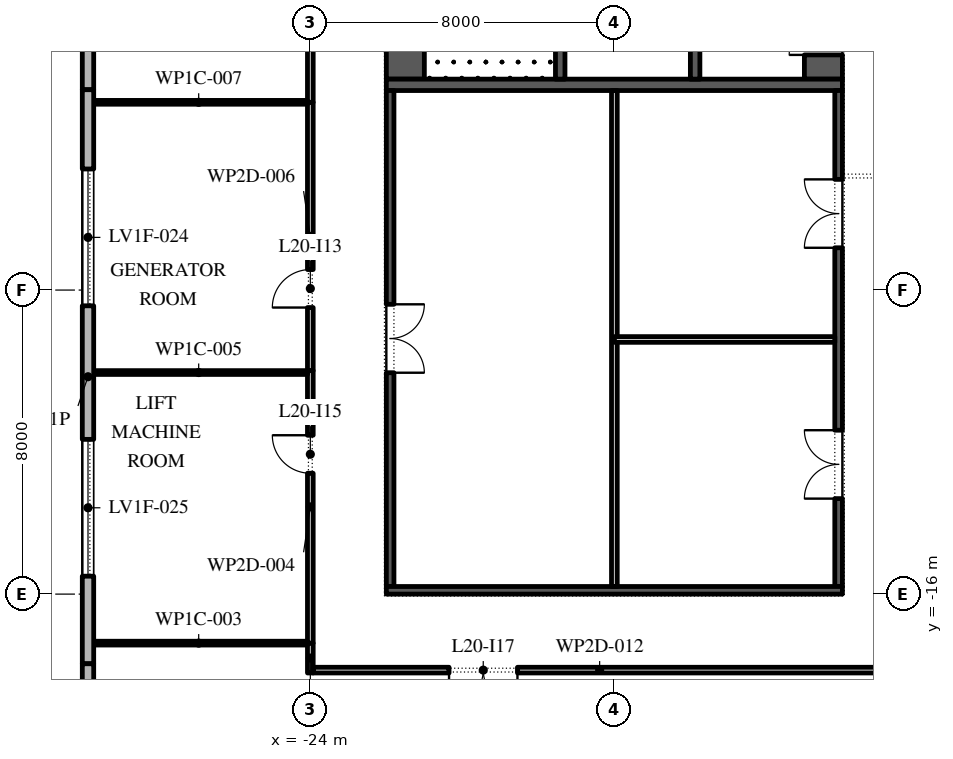
"""IFC4 building model, lengths in metres.
Left out: names, types, materials, properties, quantities, classifications, styles, units other than length and angle.
Written with IfcOpenShell. Run it as: python <this file> out.ifc"""

import sys

from ifc_helpers import new_model, si_unit, direction, frame, frame_2d, origin, place, context, subcontext, project, spatial, rectangle, extrude, element, fill, save


model = new_model("IFC4")
c1 = context("Model", 3, precision=1e-05, world=origin(), true_north=direction((0.0, 1.0)))
c2 = subcontext(c1, "Body", "Model", "MODEL_VIEW")
j1 = project(units=[si_unit("LENGTHUNIT", "METRE"), si_unit("PLANEANGLEUNIT", "RADIAN")], contexts=[c1])
p1 = place(None, origin())
s1 = spatial("IfcSite", under=j1, at=p1, CompositionType="ELEMENT")
p2 = place(p1, origin())
s2 = spatial("IfcBuilding", under=s1, at=p2, CompositionType="ELEMENT")
p3 = place(p2, frame((0.0, 0.0, 94.2)))
s3 = spatial("IfcBuildingStorey", under=s2, at=p3, CompositionType="ELEMENT", Elevation=94.2)
p4 = place(p3, frame((-21.5, -2.45, 0.0), z_axis=(0.0, 0.0, 1.0), x_axis=(0.0, 1.0, 0.0)))
e1 = element("IfcWall", 1, at=p4, inside=s3, PredefinedType="SHEAR", context=c2, shape_type="SweptSolid", body=[
    extrude(rectangle(XDim=27.9, YDim=1.0, at=frame_2d((13.95, 0.0))), origin(), (0.0, 0.0, 1.0), 4.95),
])
p5 = place(p4, frame((5.05, 0.0, 0.0)))
e2 = element("IfcOpeningElement", 2, at=p5, cuts=e1, PredefinedType="OPENING", context=c2, shape_type="SweptSolid", body=[
    extrude(rectangle(XDim=1.2, YDim=2.1, at=frame_2d((0.6, 1.05))), frame((0.0, 0.51, 0.0), z_axis=(0.0, -1.0, 0.0), x_axis=(1.0, 0.0, 0.0)), (0.0, 0.0, 1.0), 1.02),
])
p6 = place(p4, frame((21.65, 0.0, 0.0)))
e3 = element("IfcOpeningElement", 3, at=p6, cuts=e1, PredefinedType="OPENING", context=c2, shape_type="SweptSolid", body=[
    extrude(rectangle(XDim=1.2, YDim=2.1, at=frame_2d((0.6, 1.05))), frame((0.0, 0.51, 0.0), z_axis=(0.0, -1.0, 0.0), x_axis=(1.0, 0.0, 0.0)), (0.0, 0.0, 1.0), 1.02),
])
p7 = place(p3, frame((-10.5, -2.45, 0.0), z_axis=(0.0, 0.0, 1.0), x_axis=(0.0, 1.0, 0.0)))
e4 = element("IfcWall", 4, at=p7, inside=s3, PredefinedType="SHEAR", context=c2, shape_type="SweptSolid", body=[
    extrude(rectangle(XDim=27.9, YDim=1.0, at=frame_2d((13.95, 0.0))), origin(), (0.0, 0.0, 1.0), 4.95),
])
p8 = place(p7, frame((23.65, 0.0, 0.0)))
e5 = element("IfcOpeningElement", 5, at=p8, cuts=e4, PredefinedType="OPENING", context=c2, shape_type="SweptSolid", body=[
    extrude(rectangle(XDim=2.4, YDim=2.1, at=frame_2d((1.2, 1.05))), frame((0.0, 0.51, 0.0), z_axis=(0.0, -1.0, 0.0), x_axis=(1.0, 0.0, 0.0)), (0.0, 0.0, 1.0), 1.02),
])
p9 = place(p7, frame((0.637, 0.0, 0.0)))
e6 = element("IfcOpeningElement", 6, at=p9, cuts=e4, PredefinedType="OPENING", context=c2, shape_type="SweptSolid", body=[
    extrude(rectangle(XDim=1.8, YDim=2.4, at=frame_2d((0.9, 1.2))), frame((0.0, 0.51, 0.0), z_axis=(0.0, -1.0, 0.0), x_axis=(1.0, 0.0, 0.0)), (0.0, 0.0, 1.0), 1.02),
])
p10 = place(p7, frame((3.863, 0.0, 0.0)))
e7 = element("IfcOpeningElement", 7, at=p10, cuts=e4, PredefinedType="OPENING", context=c2, shape_type="SweptSolid", body=[
    extrude(rectangle(XDim=1.8, YDim=2.4, at=frame_2d((0.9, 1.2))), frame((0.0, 0.51, 0.0), z_axis=(0.0, -1.0, 0.0), x_axis=(1.0, 0.0, 0.0)), (0.0, 0.0, 1.0), 1.02),
])
p11 = place(p3, frame((-22.0, -2.6, 0.0), z_axis=(0.0, 0.0, 1.0), x_axis=(1.0, 0.0, 0.0)))
e8 = element("IfcWall", 8, at=p11, inside=s3, PredefinedType="SHEAR", context=c2, shape_type="SweptSolid", body=[
    extrude(rectangle(XDim=12.0, YDim=0.3, at=frame_2d((6.0, 0.0))), origin(), (0.0, 0.0, 1.0), 4.95),
])
p12 = place(p3, frame((-17.425, -2.45, 0.0), z_axis=(0.0, 0.0, 1.0), x_axis=(0.0, 1.0, 0.0)))
e9 = element("IfcWall", 9, at=p12, inside=s3, PredefinedType="SHEAR", context=c2, shape_type="SweptSolid", body=[
    extrude(rectangle(XDim=6.3, YDim=0.25, at=frame_2d((3.15, 0.0))), origin(), (0.0, 0.0, 1.0), 4.95),
])
p13 = place(p12, frame((5.05, 0.0, 0.0)))
e10 = element("IfcOpeningElement", 10, at=p13, cuts=e9, PredefinedType="OPENING", context=c2, shape_type="SweptSolid", body=[
    extrude(rectangle(XDim=1.2, YDim=2.1, at=frame_2d((0.6, 1.05))), frame((0.0, 0.135, 0.0), z_axis=(0.0, -1.0, 0.0), x_axis=(1.0, 0.0, 0.0)), (0.0, 0.0, 1.0), 0.27),
])
p14 = place(p3, frame((-13.875, -2.45, 0.0), z_axis=(0.0, 0.0, 1.0), x_axis=(0.0, 1.0, 0.0)))
e11 = element("IfcWall", 11, at=p14, inside=s3, PredefinedType="SHEAR", context=c2, shape_type="SweptSolid", body=[
    extrude(rectangle(XDim=21.3, YDim=0.25, at=frame_2d((10.65, 0.0))), origin(), (0.0, 0.0, 1.0), 4.95),
])
p15 = place(p14, frame((14.121, 0.0, 0.0)))
e12 = element("IfcOpeningElement", 12, at=p15, cuts=e11, PredefinedType="OPENING", context=c2, shape_type="SweptSolid", body=[
    extrude(rectangle(XDim=1.8, YDim=2.4, at=frame_2d((0.9, 1.2))), frame((0.0, 0.135, 0.0), z_axis=(0.0, -1.0, 0.0), x_axis=(1.0, 0.0, 0.0)), (0.0, 0.0, 1.0), 0.27),
])
p16 = place(p14, frame((6.971, 0.0, 0.0)))
e13 = element("IfcOpeningElement", 13, at=p16, cuts=e11, PredefinedType="OPENING", context=c2, shape_type="SweptSolid", body=[
    extrude(rectangle(XDim=1.1, YDim=2.1, at=frame_2d((0.55, 1.05))), frame((0.0, 0.135, 0.0), z_axis=(0.0, -1.0, 0.0), x_axis=(1.0, 0.0, 0.0)), (0.0, 0.0, 1.0), 0.27),
])
p17 = place(p3, frame((-21.9, -15.8, 0.0), z_axis=(0.0, 0.0, 1.0), x_axis=(0.0, 1.0, 0.0)))
e14 = element("IfcWall", 14, at=p17, inside=s3, PredefinedType="SHEAR", context=c2, shape_type="SweptSolid", body=[
    extrude(rectangle(XDim=13.05, YDim=0.2, at=frame_2d((6.525, 0.0))), origin(), (0.0, 0.0, 1.0), 4.95),
])
p18 = place(p17, frame((5.625, 0.0, 0.0)))
e15 = element("IfcOpeningElement", 15, at=p18, cuts=e14, PredefinedType="OPENING", context=c2, shape_type="SweptSolid", body=[
    extrude(rectangle(XDim=1.8, YDim=2.4, at=frame_2d((0.9, 1.2))), frame((0.0, 0.11, 0.0), z_axis=(0.0, -1.0, 0.0), x_axis=(1.0, 0.0, 0.0)), (0.0, 0.0, 1.0), 0.22),
])
p19 = place(p3, frame((-10.1, -15.8, 0.0), z_axis=(0.0, 0.0, 1.0), x_axis=(0.0, 1.0, 0.0)))
e16 = element("IfcWall", 16, at=p19, inside=s3, PredefinedType="SHEAR", context=c2, shape_type="SweptSolid", body=[
    extrude(rectangle(XDim=13.05, YDim=0.2, at=frame_2d((6.525, 0.0))), origin(), (0.0, 0.0, 1.0), 4.95),
])
p20 = place(p19, frame((2.312, 0.0, 0.0)))
e17 = element("IfcOpeningElement", 17, at=p20, cuts=e16, PredefinedType="OPENING", context=c2, shape_type="SweptSolid", body=[
    extrude(rectangle(XDim=1.8, YDim=2.4, at=frame_2d((0.9, 1.2))), frame((0.0, 0.11, 0.0), z_axis=(0.0, -1.0, 0.0), x_axis=(1.0, 0.0, 0.0)), (0.0, 0.0, 1.0), 0.22),
])
p21 = place(p19, frame((8.913, 0.0, 0.0)))
e18 = element("IfcOpeningElement", 18, at=p21, cuts=e16, PredefinedType="OPENING", context=c2, shape_type="SweptSolid", body=[
    extrude(rectangle(XDim=1.8, YDim=2.4, at=frame_2d((0.9, 1.2))), frame((0.0, 0.11, 0.0), z_axis=(0.0, -1.0, 0.0), x_axis=(1.0, 0.0, 0.0)), (0.0, 0.0, 1.0), 0.22),
])
p22 = place(p3, frame((-22.0, -15.9, 0.0), z_axis=(0.0, 0.0, 1.0), x_axis=(1.0, 0.0, 0.0)))
e19 = element("IfcWall", 19, at=p22, inside=s3, PredefinedType="SHEAR", context=c2, shape_type="SweptSolid", body=[
    extrude(rectangle(XDim=12.0, YDim=0.2, at=frame_2d((6.0, 0.0))), origin(), (0.0, 0.0, 1.0), 4.95),
])
p23 = place(p3, frame((-16.0, -15.8, 0.0), z_axis=(0.0, 0.0, 1.0), x_axis=(0.0, 1.0, 0.0)))
e20 = element("IfcWall", 20, at=p23, inside=s3, PredefinedType="PARTITIONING", context=c2, shape_type="SweptSolid", body=[
    extrude(rectangle(XDim=13.05, YDim=0.15, at=frame_2d((6.525, 0.0))), origin(), (0.0, 0.0, 1.0), 4.95),
])
p24 = place(p3, frame((-16.0, -9.3, 0.0), z_axis=(0.0, 0.0, 1.0), x_axis=(1.0, 0.0, 0.0)))
e21 = element("IfcWall", 21, at=p24, inside=s3, PredefinedType="PARTITIONING", context=c2, shape_type="SweptSolid", body=[
    extrude(rectangle(XDim=5.8, YDim=0.15, at=frame_2d((2.9, 0.0))), origin(), (0.0, 0.0, 1.0), 4.95),
])
p25 = place(p3, frame((-24.0, -18.075, 0.0), z_axis=(0.0, 0.0, 1.0), x_axis=(0.0, 1.0, 0.0)))
e22 = element("IfcWall", 22, at=p25, inside=s3, PredefinedType="PARTITIONING", context=c2, shape_type="SweptSolid", body=[
    extrude(rectangle(XDim=0.785, YDim=0.15, at=frame_2d((0.393, 0.0))), origin(), (0.0, 0.0, 1.0), 4.95),
])
p26 = place(p3, frame((-24.075, -17.29, 0.0), z_axis=(0.0, 0.0, 1.0), x_axis=(-1.0, 0.0, 0.0)))
e23 = element("IfcWall", 23, at=p26, inside=s3, PredefinedType="PARTITIONING", context=c2, shape_type="SweptSolid", body=[
    extrude(rectangle(XDim=5.725, YDim=0.1, at=frame_2d((2.863, 0.0))), origin(), (0.0, 0.0, 1.0), 4.95),
])
p27 = place(p3, frame((-24.0, -17.29, 0.0), z_axis=(0.0, 0.0, 1.0), x_axis=(0.0, 1.0, 0.0)))
e24 = element("IfcWall", 24, at=p27, inside=s3, PredefinedType="PARTITIONING", context=c2, shape_type="SweptSolid", body=[
    extrude(rectangle(XDim=7.17, YDim=0.15, at=frame_2d((3.585, 0.0))), origin(), (0.0, 0.0, 1.0), 4.95),
])
p28 = place(p27, frame((4.47, 0.0, 0.0)))
e25 = element("IfcOpeningElement", 25, at=p28, cuts=e24, PredefinedType="OPENING", context=c2, shape_type="SweptSolid", body=[
    extrude(rectangle(XDim=1.0, YDim=2.1, at=frame_2d((0.5, 1.05))), frame((0.0, 0.085, 0.0), z_axis=(0.0, -1.0, 0.0), x_axis=(1.0, 0.0, 0.0)), (0.0, 0.0, 1.0), 0.17),
])
p29 = place(p3, frame((-24.075, -10.17, 0.0), z_axis=(0.0, 0.0, 1.0), x_axis=(-1.0, 0.0, 0.0)))
e26 = element("IfcWall", 26, at=p29, inside=s3, PredefinedType="PARTITIONING", context=c2, shape_type="SweptSolid", body=[
    extrude(rectangle(XDim=5.725, YDim=0.1, at=frame_2d((2.863, 0.0))), origin(), (0.0, 0.0, 1.0), 4.95),
])
p30 = place(p3, frame((-24.0, -10.12, 0.0), z_axis=(0.0, 0.0, 1.0), x_axis=(0.0, 1.0, 0.0)))
e27 = element("IfcWall", 27, at=p30, inside=s3, PredefinedType="PARTITIONING", context=c2, shape_type="SweptSolid", body=[
    extrude(rectangle(XDim=7.06, YDim=0.15, at=frame_2d((3.53, 0.0))), origin(), (0.0, 0.0, 1.0), 4.95),
])
p31 = place(p30, frame((1.66, 0.0, 0.0)))
e28 = element("IfcOpeningElement", 28, at=p31, cuts=e27, PredefinedType="OPENING", context=c2, shape_type="SweptSolid", body=[
    extrude(rectangle(XDim=1.0, YDim=2.1, at=frame_2d((0.5, 1.05))), frame((0.0, 0.085, 0.0), z_axis=(0.0, -1.0, 0.0), x_axis=(1.0, 0.0, 0.0)), (0.0, 0.0, 1.0), 0.17),
])
p32 = place(p3, frame((-24.075, -3.06, 0.0), z_axis=(0.0, 0.0, 1.0), x_axis=(-1.0, 0.0, 0.0)))
e29 = element("IfcWall", 29, at=p32, inside=s3, PredefinedType="PARTITIONING", context=c2, shape_type="SweptSolid", body=[
    extrude(rectangle(XDim=5.725, YDim=0.1, at=frame_2d((2.863, 0.0))), origin(), (0.0, 0.0, 1.0), 4.95),
])
p33 = place(p3, frame((-24.0, -3.06, 0.0), z_axis=(0.0, 0.0, 1.0), x_axis=(0.0, 1.0, 0.0)))
e30 = element("IfcWall", 30, at=p33, inside=s3, PredefinedType="PARTITIONING", context=c2, shape_type="SweptSolid", body=[
    extrude(rectangle(XDim=14.18, YDim=0.15, at=frame_2d((7.09, 0.0))), origin(), (0.0, 0.0, 1.0), 4.95),
])
p34 = place(p33, frame((5.08, 0.0, 0.0)))
e31 = element("IfcOpeningElement", 31, at=p34, cuts=e30, PredefinedType="OPENING", context=c2, shape_type="SweptSolid", body=[
    extrude(rectangle(XDim=1.0, YDim=2.1, at=frame_2d((0.5, 1.05))), frame((0.0, 0.085, 0.0), z_axis=(0.0, -1.0, 0.0), x_axis=(1.0, 0.0, 0.0)), (0.0, 0.0, 1.0), 0.17),
])
p35 = place(p3, frame((-8.85, -18.0, 0.0), z_axis=(0.0, 0.0, 1.0), x_axis=(-1.0, 0.0, 0.0)))
e32 = element("IfcWall", 32, at=p35, inside=s3, PredefinedType="PARTITIONING", context=c2, shape_type="SweptSolid", body=[
    extrude(rectangle(XDim=15.075, YDim=0.15, at=frame_2d((7.538, 0.0))), origin(), (0.0, 0.0, 1.0), 4.95),
])
p36 = place(p35, frame((9.7, 0.0, 0.0)))
e33 = element("IfcOpeningElement", 33, at=p36, cuts=e32, PredefinedType="OPENING", context=c2, shape_type="SweptSolid", body=[
    extrude(rectangle(XDim=1.8, YDim=2.1, at=frame_2d((0.9, 1.05))), frame((0.0, 0.085, 0.0), z_axis=(0.0, -1.0, 0.0), x_axis=(1.0, 0.0, 0.0)), (0.0, 0.0, 1.0), 0.17),
])
p37 = place(p3, frame((-29.85, 15.252, 0.0), z_axis=(0.0, 0.0, 1.0), x_axis=(0.0, -1.0, 0.0)))
e34 = element("IfcWall", 34, at=p37, inside=s3, PredefinedType="STANDARD", context=c2, shape_type="SweptSolid", body=[
    extrude(rectangle(XDim=17.981, YDim=0.3, at=frame_2d((8.99, 0.0))), origin(), (0.0, 0.0, 1.0), 4.95),
])
p38 = place(p37, frame((12.952, 0.0, 0.6)))
e35 = element("IfcOpeningElement", 35, at=p38, cuts=e34, PredefinedType="OPENING", context=c2, shape_type="SweptSolid", body=[
    extrude(rectangle(XDim=3.6, YDim=3.9, at=frame_2d((1.8, 1.95))), frame((0.0, 0.16, 0.0), z_axis=(0.0, -1.0, 0.0), x_axis=(1.0, 0.0, 0.0)), (0.0, 0.0, 1.0), 0.32),
])
p39 = place(p3, frame((-29.85, -2.729, 0.0), z_axis=(0.0, 0.0, 1.0), x_axis=(0.0, -1.0, 0.0)))
e36 = element("IfcWall", 36, at=p39, inside=s3, PredefinedType="STANDARD", context=c2, shape_type="SweptSolid", body=[
    extrude(rectangle(XDim=15.104, YDim=0.3, at=frame_2d((7.552, 0.0))), origin(), (0.0, 0.0, 1.0), 4.196),
])
p40 = place(p39, frame((2.086, 0.0, 0.6)))
e37 = element("IfcOpeningElement", 37, at=p40, cuts=e36, PredefinedType="OPENING", context=c2, shape_type="SweptSolid", body=[
    extrude(rectangle(XDim=3.6, YDim=3.475, at=frame_2d((1.8, 1.738))), frame((0.0, 0.16, 0.0), z_axis=(0.0, -1.0, 0.0), x_axis=(1.0, 0.0, 0.0)), (0.0, 0.0, 1.0), 0.32),
])
p41 = place(p39, frame((9.2, 0.0, 0.6)))
e38 = element("IfcOpeningElement", 38, at=p41, cuts=e36, PredefinedType="OPENING", context=c2, shape_type="SweptSolid", body=[
    extrude(rectangle(XDim=3.6, YDim=3.475, at=frame_2d((1.8, 1.738))), frame((0.0, 0.16, 0.0), z_axis=(0.0, -1.0, 0.0), x_axis=(1.0, 0.0, 0.0)), (0.0, 0.0, 1.0), 0.32),
])
p42 = place(p3, frame((-29.85, -17.833, 0.0), z_axis=(0.0, 0.0, 1.0), x_axis=(0.0, -1.0, 0.0)))
e39 = element("IfcWall", 39, at=p42, inside=s3, PredefinedType="STANDARD", context=c2, shape_type="SweptSolid", body=[
    extrude(rectangle(XDim=6.567, YDim=0.3, at=frame_2d((3.284, 0.0))), origin(), (0.0, 0.0, 1.0), 4.95),
])
p43 = place(p40, origin())
e40 = element("IfcWindow", 40, at=p43, inside=s3, PartitioningType="DOUBLE_PANEL_HORIZONTAL", PredefinedType="WINDOW", context=c2, shape_type="SweptSolid", body=[
    extrude(rectangle(XDim=3.6, YDim=3.475, at=frame_2d((1.8, 1.738))), frame((0.0, 0.03, 0.0), z_axis=(0.0, -1.0, 0.0), x_axis=(1.0, 0.0, 0.0)), (0.0, 0.0, 1.0), 0.06),
])
fill(e37, e40)
p44 = place(p41, origin())
e41 = element("IfcWindow", 41, at=p44, inside=s3, PartitioningType="DOUBLE_PANEL_HORIZONTAL", PredefinedType="WINDOW", context=c2, shape_type="SweptSolid", body=[
    extrude(rectangle(XDim=3.6, YDim=3.475, at=frame_2d((1.8, 1.738))), frame((0.0, 0.03, 0.0), z_axis=(0.0, -1.0, 0.0), x_axis=(1.0, 0.0, 0.0)), (0.0, 0.0, 1.0), 0.06),
])
fill(e38, e41)
p45 = place(p9, origin())
e42 = element("IfcDoor", 42, at=p45, inside=s3, OperationType="DOUBLE_DOOR_SINGLE_SWING", PredefinedType="DOOR", context=c2, shape_type="SweptSolid", body=[
    extrude(rectangle(XDim=1.8, YDim=2.4, at=frame_2d((0.9, 1.2))), frame((0.0, 0.5, 0.0), z_axis=(0.0, -1.0, 0.0), x_axis=(1.0, 0.0, 0.0)), (0.0, 0.0, 1.0), 0.05),
])
fill(e6, e42)
p46 = place(p18, frame((1.8, -0.15, 0.0), z_axis=(0.0, 0.0, 1.0), x_axis=(-1.0, 0.0, 0.0)))
e43 = element("IfcDoor", 43, at=p46, inside=s3, OperationType="DOUBLE_DOOR_SINGLE_SWING", PredefinedType="DOOR", context=c2, shape_type="SweptSolid", body=[
    extrude(rectangle(XDim=1.8, YDim=2.4, at=frame_2d((0.9, 1.2))), frame((0.0, -0.05, 0.0), z_axis=(0.0, -1.0, 0.0), x_axis=(1.0, 0.0, 0.0)), (0.0, 0.0, 1.0), 0.05),
])
fill(e15, e43)
p47 = place(p20, origin())
e44 = element("IfcDoor", 44, at=p47, inside=s3, OperationType="DOUBLE_DOOR_SINGLE_SWING", PredefinedType="DOOR", context=c2, shape_type="SweptSolid", body=[
    extrude(rectangle(XDim=1.8, YDim=2.4, at=frame_2d((0.9, 1.2))), frame((0.0, 0.1, 0.0), z_axis=(0.0, -1.0, 0.0), x_axis=(1.0, 0.0, 0.0)), (0.0, 0.0, 1.0), 0.05),
])
fill(e17, e44)
p48 = place(p21, origin())
e45 = element("IfcDoor", 45, at=p48, inside=s3, OperationType="DOUBLE_DOOR_SINGLE_SWING", PredefinedType="DOOR", context=c2, shape_type="SweptSolid", body=[
    extrude(rectangle(XDim=1.8, YDim=2.4, at=frame_2d((0.9, 1.2))), frame((0.0, 0.1, 0.0), z_axis=(0.0, -1.0, 0.0), x_axis=(1.0, 0.0, 0.0)), (0.0, 0.0, 1.0), 0.05),
])
fill(e18, e45)
p49 = place(p31, origin())
e46 = element("IfcDoor", 46, at=p49, inside=s3, OperationType="SINGLE_SWING_RIGHT", PredefinedType="DOOR", context=c2, shape_type="SweptSolid", body=[
    extrude(rectangle(XDim=1.0, YDim=2.1, at=frame_2d((0.5, 1.05))), frame((0.0, 0.025, 0.0), z_axis=(0.0, -1.0, 0.0), x_axis=(1.0, 0.0, 0.0)), (0.0, 0.0, 1.0), 0.05),
])
fill(e28, e46)
p50 = place(p28, origin())
e47 = element("IfcDoor", 47, at=p50, inside=s3, OperationType="SINGLE_SWING_LEFT", PredefinedType="DOOR", context=c2, shape_type="SweptSolid", body=[
    extrude(rectangle(XDim=1.0, YDim=2.1, at=frame_2d((0.5, 1.05))), frame((0.0, 0.025, 0.0), z_axis=(0.0, -1.0, 0.0), x_axis=(1.0, 0.0, 0.0)), (0.0, 0.0, 1.0), 0.05),
])
fill(e25, e47)
p51 = place(p36, origin())
e48 = element("IfcDoor", 48, at=p51, inside=s3, OperationType="SINGLE_SWING_RIGHT", PredefinedType="DOOR", context=c2, shape_type="SweptSolid", body=[
    extrude(rectangle(XDim=1.8, YDim=2.1, at=frame_2d((0.9, 1.05))), frame((0.0, 0.025, 0.0), z_axis=(0.0, -1.0, 0.0), x_axis=(1.0, 0.0, 0.0)), (0.0, 0.0, 1.0), 0.05),
])
fill(e33, e48)
save(model, sys.argv[1])
